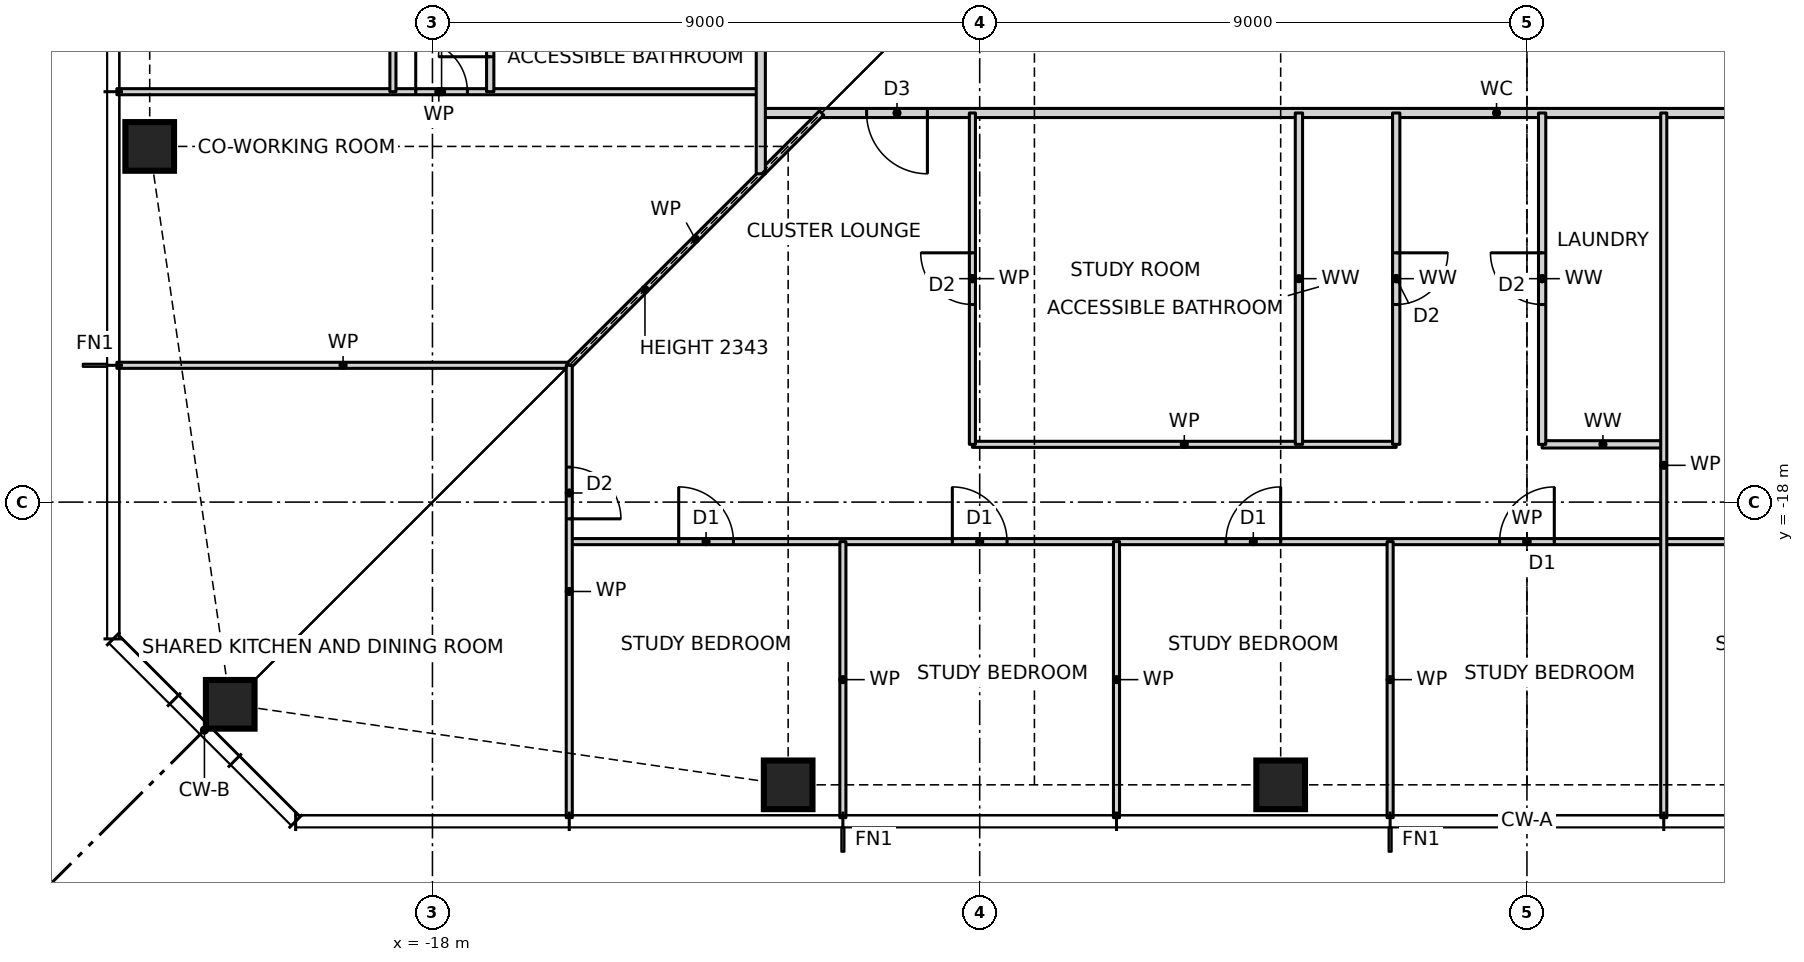
"""IFC4 building model, lengths in metres.
Left out: names, types, materials, properties, quantities, classifications, styles, units other than length and angle.
Written with IfcOpenShell. Run it as: python <this file> out.ifc"""

import sys

from ifc_helpers import new_model, si_unit, direction, frame, frame_2d, origin, origin_2d, place, context, subcontext, project, spatial, rectangle, hollow_rectangle, extrude, element, fill, save


model = new_model("IFC4")
c1 = context("Model", 3, precision=1e-05, world=origin(), true_north=direction((0.0, 1.0)))
c2 = subcontext(c1, "Body", "Model", "MODEL_VIEW")
j1 = project(units=[si_unit("LENGTHUNIT", "METRE"), si_unit("PLANEANGLEUNIT", "RADIAN")], contexts=[c1])
p1 = place(None, origin())
s1 = spatial("IfcSite", under=j1, at=p1, CompositionType="ELEMENT")
p2 = place(p1, origin())
s2 = spatial("IfcBuilding", under=s1, at=p2, CompositionType="ELEMENT")
p3 = place(p2, frame((0.0, 0.0, 50.0)))
s3 = spatial("IfcBuildingStorey", under=s2, at=p3, CompositionType="ELEMENT", Elevation=50.0)
for number, where, z_axis, x_axis in (
    (1, (-21.326, -21.326, 0.0), (0.0, 0.0, 1.0), (1.0, 0.0, 0.0)),
    (2, (-12.15, -22.65, 0.0), (0.0, 0.0, 1.0), (1.0, 0.0, 0.0)),
    (3, (-4.05, -22.65, 0.0), (0.0, 0.0, 1.0), (1.0, 0.0, 0.0)),
    (4, (-22.65, -12.15, 0.0), (0.0, 0.0, 1.0), (1.0, 0.0, 0.0)),
):
    element("IfcColumn", number, at=place(p3, frame(where, z_axis=z_axis, x_axis=x_axis)), inside=s3, PredefinedType="COLUMN", context=c2, shape_type="SweptSolid", body=[
        extrude(hollow_rectangle(XDim=0.8, YDim=0.8, WallThickness=0.09, at=origin_2d()), origin(), (0.0, 0.0, 1.0), 3.5),
    ])
p4 = place(p3, frame((-15.75, -18.65, 0.0), z_axis=(0.0, 0.0, 1.0), x_axis=(1.0, 0.0, 0.0)))
e5 = element("IfcWall", 5, at=p4, inside=s3, PredefinedType="PARTITIONING", context=c2, shape_type="SweptSolid", body=[
    extrude(rectangle(XDim=31.5, YDim=0.1, at=frame_2d((15.75, 0.0))), origin(), (0.0, 0.0, 1.0), 3.27),
])
p5 = place(p4, frame((1.8, 0.0, 0.0)))
e6 = element("IfcOpeningElement", 6, at=p5, cuts=e5, PredefinedType="OPENING", context=c2, shape_type="SweptSolid", body=[
    extrude(rectangle(XDim=0.9, YDim=2.1, at=frame_2d((0.45, 1.05))), frame((0.0, 0.06, 0.0), z_axis=(0.0, -1.0, 0.0), x_axis=(1.0, 0.0, 0.0)), (0.0, 0.0, 1.0), 0.12),
])
p6 = place(p4, frame((6.3, 0.0, 0.0)))
e7 = element("IfcOpeningElement", 7, at=p6, cuts=e5, PredefinedType="OPENING", context=c2, shape_type="SweptSolid", body=[
    extrude(rectangle(XDim=0.9, YDim=2.1, at=frame_2d((0.45, 1.05))), frame((0.0, 0.06, 0.0), z_axis=(0.0, -1.0, 0.0), x_axis=(1.0, 0.0, 0.0)), (0.0, 0.0, 1.0), 0.12),
])
p7 = place(p4, frame((10.8, 0.0, 0.0)))
e8 = element("IfcOpeningElement", 8, at=p7, cuts=e5, PredefinedType="OPENING", context=c2, shape_type="SweptSolid", body=[
    extrude(rectangle(XDim=0.9, YDim=2.1, at=frame_2d((0.45, 1.05))), frame((0.0, 0.06, 0.0), z_axis=(0.0, -1.0, 0.0), x_axis=(1.0, 0.0, 0.0)), (0.0, 0.0, 1.0), 0.12),
])
p8 = place(p4, frame((15.3, 0.0, 0.0)))
e9 = element("IfcOpeningElement", 9, at=p8, cuts=e5, PredefinedType="OPENING", context=c2, shape_type="SweptSolid", body=[
    extrude(rectangle(XDim=0.9, YDim=2.1, at=frame_2d((0.45, 1.05))), frame((0.0, 0.06, 0.0), z_axis=(0.0, -1.0, 0.0), x_axis=(1.0, 0.0, 0.0)), (0.0, 0.0, 1.0), 0.12),
])
p9 = place(p4, frame((19.8, 0.0, 0.0)))
e10 = element("IfcOpeningElement", 10, at=p9, cuts=e5, PredefinedType="OPENING", context=c2, shape_type="SweptSolid", body=[
    extrude(rectangle(XDim=0.9, YDim=2.1, at=frame_2d((0.45, 1.05))), frame((0.0, 0.06, 0.0), z_axis=(0.0, -1.0, 0.0), x_axis=(1.0, 0.0, 0.0)), (0.0, 0.0, 1.0), 0.12),
])
p10 = place(p4, frame((24.3, 0.0, 0.0)))
e11 = element("IfcOpeningElement", 11, at=p10, cuts=e5, PredefinedType="OPENING", context=c2, shape_type="SweptSolid", body=[
    extrude(rectangle(XDim=0.9, YDim=2.1, at=frame_2d((0.45, 1.05))), frame((0.0, 0.06, 0.0), z_axis=(0.0, -1.0, 0.0), x_axis=(1.0, 0.0, 0.0)), (0.0, 0.0, 1.0), 0.12),
])
p11 = place(p4, frame((28.8, 0.0, 0.0)))
e12 = element("IfcOpeningElement", 12, at=p11, cuts=e5, PredefinedType="OPENING", context=c2, shape_type="SweptSolid", body=[
    extrude(rectangle(XDim=0.9, YDim=2.1, at=frame_2d((0.45, 1.05))), frame((0.0, 0.06, 0.0), z_axis=(0.0, -1.0, 0.0), x_axis=(1.0, 0.0, 0.0)), (0.0, 0.0, 1.0), 0.12),
])
p12 = place(p3, frame((-9.12, -17.05, 0.0), z_axis=(0.0, 0.0, 1.0), x_axis=(1.0, 0.0, 0.0)))
e13 = element("IfcWall", 13, at=p12, inside=s3, PredefinedType="PARTITIONING", context=c2, shape_type="SweptSolid", body=[
    extrude(rectangle(XDim=6.97, YDim=0.1, at=frame_2d((3.485, 0.0))), origin(), (0.0, 0.0, 1.0), 3.27),
])
p13 = place(p3, frame((0.25, -17.05, 0.0), z_axis=(0.0, 0.0, 1.0), x_axis=(1.0, 0.0, 0.0)))
e14 = element("IfcWall", 14, at=p13, inside=s3, PredefinedType="PARTITIONING", context=c2, shape_type="SweptSolid", body=[
    extrude(rectangle(XDim=2.0, YDim=0.12, at=frame_2d((1.0, 0.0))), origin(), (0.0, 0.0, 1.0), 3.27),
])
p14 = place(p3, frame((-23.19, -15.75, 0.0), z_axis=(0.0, 0.0, 1.0), x_axis=(1.0, 0.0, 0.0)))
e15 = element("IfcWall", 15, at=p14, inside=s3, PredefinedType="PARTITIONING", context=c2, shape_type="SweptSolid", body=[
    extrude(rectangle(XDim=7.44, YDim=0.1, at=frame_2d((3.72, 0.0))), origin(), (0.0, 0.0, 1.0), 3.27),
])
p15 = place(p3, frame((-12.6, -11.6, 0.0), z_axis=(0.0, 0.0, 1.0), x_axis=(1.0, 0.0, 0.0)))
e16 = element("IfcWall", 16, at=p15, inside=s3, PredefinedType="PARTITIONING", context=c2, shape_type="SweptSolid", body=[
    extrude(rectangle(XDim=24.2, YDim=0.15, at=frame_2d((12.1, 0.0))), origin(), (0.0, 0.0, 1.0), 3.27),
])
p16 = place(p15, frame((1.74, 0.0, 0.0)))
e17 = element("IfcOpeningElement", 17, at=p16, cuts=e16, PredefinedType="OPENING", context=c2, shape_type="SweptSolid", body=[
    extrude(rectangle(XDim=1.0, YDim=2.1, at=frame_2d((0.5, 1.05))), frame((0.0, 0.085, 0.0), z_axis=(0.0, -1.0, 0.0), x_axis=(1.0, 0.0, 0.0)), (0.0, 0.0, 1.0), 0.17),
])
p17 = place(p15, frame((22.025, 0.0, 0.0)))
e18 = element("IfcOpeningElement", 18, at=p17, cuts=e16, PredefinedType="OPENING", context=c2, shape_type="SweptSolid", body=[
    extrude(rectangle(XDim=1.0, YDim=2.1, at=frame_2d((0.5, 1.05))), frame((0.0, 0.085, 0.0), z_axis=(0.0, -1.0, 0.0), x_axis=(1.0, 0.0, 0.0)), (0.0, 0.0, 1.0), 0.17),
])
p18 = place(p3, frame((-23.19, -11.25, 0.0), z_axis=(0.0, 0.0, 1.0), x_axis=(1.0, 0.0, 0.0)))
e19 = element("IfcWall", 19, at=p18, inside=s3, PredefinedType="PARTITIONING", context=c2, shape_type="SweptSolid", body=[
    extrude(rectangle(XDim=10.59, YDim=0.1, at=frame_2d((5.295, 0.0))), origin(), (0.0, 0.0, 1.0), 3.27),
])
p19 = place(p18, frame((4.915, 0.0, 0.0)))
e20 = element("IfcOpeningElement", 20, at=p19, cuts=e19, PredefinedType="OPENING", context=c2, shape_type="SweptSolid", body=[
    extrude(rectangle(XDim=0.85, YDim=2.1, at=frame_2d((0.425, 1.05))), frame((0.0, 0.06, 0.0), z_axis=(0.0, -1.0, 0.0), x_axis=(1.0, 0.0, 0.0)), (0.0, 0.0, 1.0), 0.12),
])
p20 = place(p3, frame((-15.75, -15.75, 0.0), z_axis=(0.0, 0.0, 1.0), x_axis=(0.707106781187, 0.707106781187, 0.0)))
e21 = element("IfcWall", 21, at=p20, inside=s3, PredefinedType="PARTITIONING", context=c2, shape_type="SweptSolid", body=[
    extrude(rectangle(XDim=5.869, YDim=0.1, at=frame_2d((2.935, 0.0))), origin(), (0.0, 0.0, 1.0), 2.343),
])
p21 = place(p3, frame((2.25, -23.19, 0.0), z_axis=(0.0, 0.0, 1.0), x_axis=(0.0, 1.0, 0.0)))
e22 = element("IfcWall", 22, at=p21, inside=s3, PredefinedType="PARTITIONING", context=c2, shape_type="SweptSolid", body=[
    extrude(rectangle(XDim=11.59, YDim=0.1, at=frame_2d((5.795, 0.0))), origin(), (0.0, 0.0, 1.0), 3.27),
])
p22 = place(p3, frame((0.25, -17.05, 0.0), z_axis=(0.0, 0.0, 1.0), x_axis=(0.0, 1.0, 0.0)))
e23 = element("IfcWall", 23, at=p22, inside=s3, PredefinedType="PARTITIONING", context=c2, shape_type="SweptSolid", body=[
    extrude(rectangle(XDim=5.45, YDim=0.12, at=frame_2d((2.725, 0.0))), origin(), (0.0, 0.0, 1.0), 3.27),
])
p23 = place(p22, frame((2.3, 0.0, 0.0)))
e24 = element("IfcOpeningElement", 24, at=p23, cuts=e23, PredefinedType="OPENING", context=c2, shape_type="SweptSolid", body=[
    extrude(rectangle(XDim=0.85, YDim=2.1, at=frame_2d((0.425, 1.05))), frame((0.0, 0.07, 0.0), z_axis=(0.0, -1.0, 0.0), x_axis=(1.0, 0.0, 0.0)), (0.0, 0.0, 1.0), 0.14),
])
p24 = place(p3, frame((-2.15, -17.05, 0.0), z_axis=(0.0, 0.0, 1.0), x_axis=(0.0, 1.0, 0.0)))
e25 = element("IfcWall", 25, at=p24, inside=s3, PredefinedType="PARTITIONING", context=c2, shape_type="SweptSolid", body=[
    extrude(rectangle(XDim=5.45, YDim=0.12, at=frame_2d((2.725, 0.0))), origin(), (0.0, 0.0, 1.0), 3.27),
])
p25 = place(p24, frame((2.3, 0.0, 0.0)))
e26 = element("IfcOpeningElement", 26, at=p25, cuts=e25, PredefinedType="OPENING", context=c2, shape_type="SweptSolid", body=[
    extrude(rectangle(XDim=0.85, YDim=2.1, at=frame_2d((0.425, 1.05))), frame((0.0, 0.07, 0.0), z_axis=(0.0, -1.0, 0.0), x_axis=(1.0, 0.0, 0.0)), (0.0, 0.0, 1.0), 0.14),
])
p26 = place(p3, frame((-2.25, -23.19, 0.0), z_axis=(0.0, 0.0, 1.0), x_axis=(0.0, 1.0, 0.0)))
e27 = element("IfcWall", 27, at=p26, inside=s3, PredefinedType="PARTITIONING", context=c2, shape_type="SweptSolid", body=[
    extrude(rectangle(XDim=4.54, YDim=0.1, at=frame_2d((2.27, 0.0))), origin(), (0.0, 0.0, 1.0), 3.27),
])
p27 = place(p3, frame((-3.75, -17.05, 0.0), z_axis=(0.0, 0.0, 1.0), x_axis=(0.0, 1.0, 0.0)))
e28 = element("IfcWall", 28, at=p27, inside=s3, PredefinedType="PARTITIONING", context=c2, shape_type="SweptSolid", body=[
    extrude(rectangle(XDim=5.45, YDim=0.12, at=frame_2d((2.725, 0.0))), origin(), (0.0, 0.0, 1.0), 3.27),
])
p28 = place(p3, frame((-6.75, -23.19, 0.0), z_axis=(0.0, 0.0, 1.0), x_axis=(0.0, 1.0, 0.0)))
e29 = element("IfcWall", 29, at=p28, inside=s3, PredefinedType="PARTITIONING", context=c2, shape_type="SweptSolid", body=[
    extrude(rectangle(XDim=4.54, YDim=0.1, at=frame_2d((2.27, 0.0))), origin(), (0.0, 0.0, 1.0), 3.27),
])
p29 = place(p3, frame((-9.12, -17.05, 0.0), z_axis=(0.0, 0.0, 1.0), x_axis=(0.0, 1.0, 0.0)))
e30 = element("IfcWall", 30, at=p29, inside=s3, PredefinedType="PARTITIONING", context=c2, shape_type="SweptSolid", body=[
    extrude(rectangle(XDim=5.45, YDim=0.1, at=frame_2d((2.725, 0.0))), origin(), (0.0, 0.0, 1.0), 3.27),
])
p30 = place(p29, frame((2.3, 0.0, 0.0)))
e31 = element("IfcOpeningElement", 31, at=p30, cuts=e30, PredefinedType="OPENING", context=c2, shape_type="SweptSolid", body=[
    extrude(rectangle(XDim=0.85, YDim=2.1, at=frame_2d((0.425, 1.05))), frame((0.0, 0.06, 0.0), z_axis=(0.0, -1.0, 0.0), x_axis=(1.0, 0.0, 0.0)), (0.0, 0.0, 1.0), 0.12),
])
p31 = place(p3, frame((-11.25, -23.19, 0.0), z_axis=(0.0, 0.0, 1.0), x_axis=(0.0, 1.0, 0.0)))
e32 = element("IfcWall", 32, at=p31, inside=s3, PredefinedType="PARTITIONING", context=c2, shape_type="SweptSolid", body=[
    extrude(rectangle(XDim=4.54, YDim=0.1, at=frame_2d((2.27, 0.0))), origin(), (0.0, 0.0, 1.0), 3.27),
])
p32 = place(p3, frame((-12.6, -12.6, 0.0), z_axis=(0.0, 0.0, 1.0), x_axis=(0.0, 1.0, 0.0)))
e33 = element("IfcWall", 33, at=p32, inside=s3, PredefinedType="PARTITIONING", context=c2, shape_type="SweptSolid", body=[
    extrude(rectangle(XDim=25.2, YDim=0.15, at=frame_2d((12.6, 0.0))), origin(), (0.0, 0.0, 1.0), 3.27),
])
p33 = place(p32, frame((7.15, 0.0, 0.0)))
e34 = element("IfcOpeningElement", 34, at=p33, cuts=e33, PredefinedType="OPENING", context=c2, shape_type="SweptSolid", body=[
    extrude(rectangle(XDim=1.0, YDim=2.1, at=frame_2d((0.5, 1.05))), frame((0.0, 0.085, 0.0), z_axis=(0.0, -1.0, 0.0), x_axis=(1.0, 0.0, 0.0)), (0.0, 0.0, 1.0), 0.17),
])
p34 = place(p3, frame((-15.75, -23.19, 0.0), z_axis=(0.0, 0.0, 1.0), x_axis=(0.0, 1.0, 0.0)))
e35 = element("IfcWall", 35, at=p34, inside=s3, PredefinedType="PARTITIONING", context=c2, shape_type="SweptSolid", body=[
    extrude(rectangle(XDim=7.44, YDim=0.1, at=frame_2d((3.72, 0.0))), origin(), (0.0, 0.0, 1.0), 3.27),
])
p35 = place(p34, frame((4.915, 0.0, 0.0)))
e36 = element("IfcOpeningElement", 36, at=p35, cuts=e35, PredefinedType="OPENING", context=c2, shape_type="SweptSolid", body=[
    extrude(rectangle(XDim=0.85, YDim=2.1, at=frame_2d((0.425, 1.05))), frame((0.0, 0.06, 0.0), z_axis=(0.0, -1.0, 0.0), x_axis=(1.0, 0.0, 0.0)), (0.0, 0.0, 1.0), 0.12),
])
p36 = place(p3, frame((-17.05, -11.25, 0.0), z_axis=(0.0, 0.0, 1.0), x_axis=(0.0, 1.0, 0.0)))
e37 = element("IfcWall", 37, at=p36, inside=s3, PredefinedType="PARTITIONING", context=c2, shape_type="SweptSolid", body=[
    extrude(rectangle(XDim=5.1, YDim=0.12, at=frame_2d((2.55, 0.0))), origin(), (0.0, 0.0, 1.0), 3.27),
])
p37 = place(p36, frame((2.375, 0.0, 0.0)))
e38 = element("IfcOpeningElement", 38, at=p37, cuts=e37, PredefinedType="OPENING", context=c2, shape_type="SweptSolid", body=[
    extrude(rectangle(XDim=0.85, YDim=2.1, at=frame_2d((0.425, 1.05))), frame((0.0, 0.07, 0.0), z_axis=(0.0, -1.0, 0.0), x_axis=(1.0, 0.0, 0.0)), (0.0, 0.0, 1.0), 0.14),
])
p38 = place(p36, frame((0.575, 0.0, 0.0)))
e39 = element("IfcOpeningElement", 39, at=p38, cuts=e37, PredefinedType="OPENING", context=c2, shape_type="SweptSolid", body=[
    extrude(rectangle(XDim=0.85, YDim=2.1, at=frame_2d((0.425, 1.05))), frame((0.0, 0.07, 0.0), z_axis=(0.0, -1.0, 0.0), x_axis=(1.0, 0.0, 0.0)), (0.0, 0.0, 1.0), 0.14),
])
p39 = place(p3, frame((-18.65, -11.25, 0.0), z_axis=(0.0, 0.0, 1.0), x_axis=(0.0, 1.0, 0.0)))
e40 = element("IfcWall", 40, at=p39, inside=s3, PredefinedType="PARTITIONING", context=c2, shape_type="SweptSolid", body=[
    extrude(rectangle(XDim=27.0, YDim=0.1, at=frame_2d((13.5, 0.0))), origin(), (0.0, 0.0, 1.0), 3.27),
])
p40 = place(p39, frame((24.3, 0.0, 0.0)))
e41 = element("IfcOpeningElement", 41, at=p40, cuts=e40, PredefinedType="OPENING", context=c2, shape_type="SweptSolid", body=[
    extrude(rectangle(XDim=0.9, YDim=2.1, at=frame_2d((0.45, 1.05))), frame((0.0, 0.06, 0.0), z_axis=(0.0, -1.0, 0.0), x_axis=(1.0, 0.0, 0.0)), (0.0, 0.0, 1.0), 0.12),
])
p41 = place(p39, frame((19.8, 0.0, 0.0)))
e42 = element("IfcOpeningElement", 42, at=p41, cuts=e40, PredefinedType="OPENING", context=c2, shape_type="SweptSolid", body=[
    extrude(rectangle(XDim=0.9, YDim=2.1, at=frame_2d((0.45, 1.05))), frame((0.0, 0.06, 0.0), z_axis=(0.0, -1.0, 0.0), x_axis=(1.0, 0.0, 0.0)), (0.0, 0.0, 1.0), 0.12),
])
p42 = place(p39, frame((15.3, 0.0, 0.0)))
e43 = element("IfcOpeningElement", 43, at=p42, cuts=e40, PredefinedType="OPENING", context=c2, shape_type="SweptSolid", body=[
    extrude(rectangle(XDim=0.9, YDim=2.1, at=frame_2d((0.45, 1.05))), frame((0.0, 0.06, 0.0), z_axis=(0.0, -1.0, 0.0), x_axis=(1.0, 0.0, 0.0)), (0.0, 0.0, 1.0), 0.12),
])
p43 = place(p39, frame((10.8, 0.0, 0.0)))
e44 = element("IfcOpeningElement", 44, at=p43, cuts=e40, PredefinedType="OPENING", context=c2, shape_type="SweptSolid", body=[
    extrude(rectangle(XDim=0.9, YDim=2.1, at=frame_2d((0.45, 1.05))), frame((0.0, 0.06, 0.0), z_axis=(0.0, -1.0, 0.0), x_axis=(1.0, 0.0, 0.0)), (0.0, 0.0, 1.0), 0.12),
])
p44 = place(p39, frame((6.3, 0.0, 0.0)))
e45 = element("IfcOpeningElement", 45, at=p44, cuts=e40, PredefinedType="OPENING", context=c2, shape_type="SweptSolid", body=[
    extrude(rectangle(XDim=0.9, YDim=2.1, at=frame_2d((0.45, 1.05))), frame((0.0, 0.06, 0.0), z_axis=(0.0, -1.0, 0.0), x_axis=(1.0, 0.0, 0.0)), (0.0, 0.0, 1.0), 0.12),
])
p45 = place(p39, frame((1.8, 0.0, 0.0)))
e46 = element("IfcOpeningElement", 46, at=p45, cuts=e40, PredefinedType="OPENING", context=c2, shape_type="SweptSolid", body=[
    extrude(rectangle(XDim=0.9, YDim=2.1, at=frame_2d((0.45, 1.05))), frame((0.0, 0.06, 0.0), z_axis=(0.0, -1.0, 0.0), x_axis=(1.0, 0.0, 0.0)), (0.0, 0.0, 1.0), 0.12),
])
p46 = place(p5, origin())
e47 = element("IfcDoor", 47, at=p46, inside=s3, OperationType="SINGLE_SWING_LEFT", PredefinedType="DOOR", context=c2, shape_type="SweptSolid", body=[
    extrude(rectangle(XDim=0.9, YDim=2.1, at=frame_2d((0.45, 1.05))), frame((0.0, 0.025, 0.0), z_axis=(0.0, -1.0, 0.0), x_axis=(1.0, 0.0, 0.0)), (0.0, 0.0, 1.0), 0.05),
])
fill(e6, e47)
p47 = place(p6, origin())
e48 = element("IfcDoor", 48, at=p47, inside=s3, OperationType="SINGLE_SWING_LEFT", PredefinedType="DOOR", context=c2, shape_type="SweptSolid", body=[
    extrude(rectangle(XDim=0.9, YDim=2.1, at=frame_2d((0.45, 1.05))), frame((0.0, 0.025, 0.0), z_axis=(0.0, -1.0, 0.0), x_axis=(1.0, 0.0, 0.0)), (0.0, 0.0, 1.0), 0.05),
])
fill(e7, e48)
p48 = place(p7, origin())
e49 = element("IfcDoor", 49, at=p48, inside=s3, OperationType="SINGLE_SWING_RIGHT", PredefinedType="DOOR", context=c2, shape_type="SweptSolid", body=[
    extrude(rectangle(XDim=0.9, YDim=2.1, at=frame_2d((0.45, 1.05))), frame((0.0, 0.025, 0.0), z_axis=(0.0, -1.0, 0.0), x_axis=(1.0, 0.0, 0.0)), (0.0, 0.0, 1.0), 0.05),
])
fill(e8, e49)
p49 = place(p8, origin())
e50 = element("IfcDoor", 50, at=p49, inside=s3, OperationType="SINGLE_SWING_RIGHT", PredefinedType="DOOR", context=c2, shape_type="SweptSolid", body=[
    extrude(rectangle(XDim=0.9, YDim=2.1, at=frame_2d((0.45, 1.05))), frame((0.0, 0.025, 0.0), z_axis=(0.0, -1.0, 0.0), x_axis=(1.0, 0.0, 0.0)), (0.0, 0.0, 1.0), 0.05),
])
fill(e9, e50)
p50 = place(p16, frame((1.0, 0.0, 0.0), z_axis=(0.0, 0.0, 1.0), x_axis=(-1.0, 0.0, 0.0)))
e51 = element("IfcDoor", 51, at=p50, inside=s3, OperationType="SINGLE_SWING_LEFT", PredefinedType="DOOR", context=c2, shape_type="SweptSolid", body=[
    extrude(rectangle(XDim=1.0, YDim=2.1, at=frame_2d((0.5, 1.05))), frame((0.0, 0.025, 0.0), z_axis=(0.0, -1.0, 0.0), x_axis=(1.0, 0.0, 0.0)), (0.0, 0.0, 1.0), 0.05),
])
fill(e17, e51)
p51 = place(p30, origin())
e52 = element("IfcDoor", 52, at=p51, inside=s3, OperationType="SINGLE_SWING_RIGHT", PredefinedType="DOOR", context=c2, shape_type="SweptSolid", body=[
    extrude(rectangle(XDim=0.85, YDim=2.1, at=frame_2d((0.425, 1.05))), frame((0.0, 0.025, 0.0), z_axis=(0.0, -1.0, 0.0), x_axis=(1.0, 0.0, 0.0)), (0.0, 0.0, 1.0), 0.05),
])
fill(e31, e52)
p52 = place(p25, frame((0.85, 0.0, 0.0), z_axis=(0.0, 0.0, 1.0), x_axis=(-1.0, 0.0, 0.0)))
e53 = element("IfcDoor", 53, at=p52, inside=s3, OperationType="SINGLE_SWING_LEFT", PredefinedType="DOOR", context=c2, shape_type="SweptSolid", body=[
    extrude(rectangle(XDim=0.85, YDim=2.1, at=frame_2d((0.425, 1.05))), frame((0.0, 0.025, 0.0), z_axis=(0.0, -1.0, 0.0), x_axis=(1.0, 0.0, 0.0)), (0.0, 0.0, 1.0), 0.05),
])
fill(e26, e53)
p53 = place(p23, origin())
e54 = element("IfcDoor", 54, at=p53, inside=s3, OperationType="SINGLE_SWING_RIGHT", PredefinedType="DOOR", context=c2, shape_type="SweptSolid", body=[
    extrude(rectangle(XDim=0.85, YDim=2.1, at=frame_2d((0.425, 1.05))), frame((0.0, 0.025, 0.0), z_axis=(0.0, -1.0, 0.0), x_axis=(1.0, 0.0, 0.0)), (0.0, 0.0, 1.0), 0.05),
])
fill(e24, e54)
p54 = place(p38, origin())
e55 = element("IfcDoor", 55, at=p54, inside=s3, OperationType="SINGLE_SWING_LEFT", PredefinedType="DOOR", context=c2, shape_type="SweptSolid", body=[
    extrude(rectangle(XDim=0.85, YDim=2.1, at=frame_2d((0.425, 1.05))), frame((0.0, 0.025, 0.0), z_axis=(0.0, -1.0, 0.0), x_axis=(1.0, 0.0, 0.0)), (0.0, 0.0, 1.0), 0.05),
])
fill(e39, e55)
p55 = place(p19, origin())
e56 = element("IfcDoor", 56, at=p55, inside=s3, OperationType="SINGLE_SWING_LEFT", PredefinedType="DOOR", context=c2, shape_type="SweptSolid", body=[
    extrude(rectangle(XDim=0.85, YDim=2.1, at=frame_2d((0.425, 1.05))), frame((0.0, 0.025, 0.0), z_axis=(0.0, -1.0, 0.0), x_axis=(1.0, 0.0, 0.0)), (0.0, 0.0, 1.0), 0.05),
])
fill(e20, e56)
p56 = place(p35, frame((0.85, 0.0, 0.0), z_axis=(0.0, 0.0, 1.0), x_axis=(-1.0, 0.0, 0.0)))
e57 = element("IfcDoor", 57, at=p56, inside=s3, OperationType="SINGLE_SWING_RIGHT", PredefinedType="DOOR", context=c2, shape_type="SweptSolid", body=[
    extrude(rectangle(XDim=0.85, YDim=2.1, at=frame_2d((0.425, 1.05))), frame((0.0, 0.025, 0.0), z_axis=(0.0, -1.0, 0.0), x_axis=(1.0, 0.0, 0.0)), (0.0, 0.0, 1.0), 0.05),
])
fill(e36, e57)
save(model, sys.argv[1])
